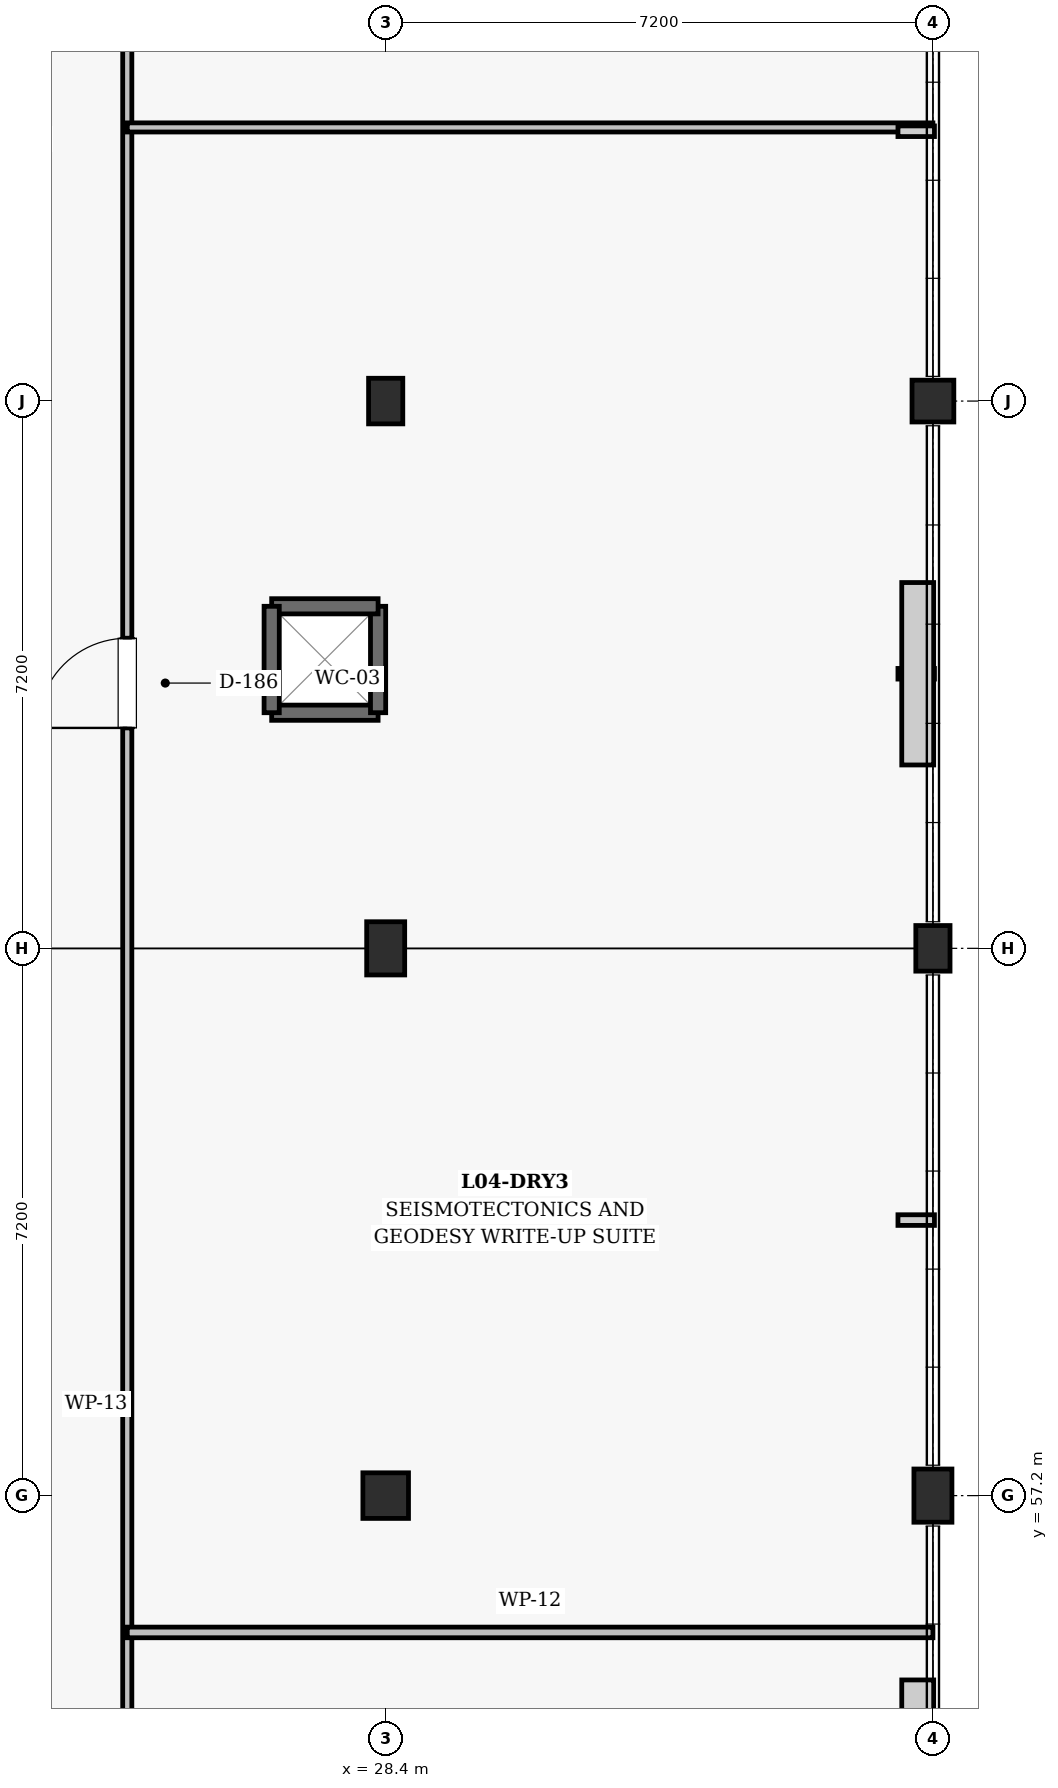
"""IFC4 building model, lengths in metres.
Left out: names, types, materials, properties, quantities, classifications, styles, units other than length and angle.
Written with IfcOpenShell. Run it as: python <this file> out.ifc"""

import sys

from ifc_helpers import new_model, si_unit, direction, frame, frame_2d, origin, origin_2d, place, context, subcontext, project, spatial, rectangle, extrude, element, fill, save


model = new_model("IFC4")
c1 = context("Model", 3, precision=1e-05, world=origin(), true_north=direction((0.0, 1.0)))
c2 = subcontext(c1, "Body", "Model", "MODEL_VIEW")
j1 = project(units=[si_unit("LENGTHUNIT", "METRE"), si_unit("PLANEANGLEUNIT", "RADIAN")], contexts=[c1])
p1 = place(None, origin())
s1 = spatial("IfcSite", under=j1, at=p1, CompositionType="ELEMENT")
p2 = place(p1, origin())
s2 = spatial("IfcBuilding", under=s1, at=p2, CompositionType="ELEMENT")
p3 = place(p2, frame((0.0, 0.0, 18.9)))
s3 = spatial("IfcBuildingStorey", under=s2, at=p3, CompositionType="ELEMENT", Elevation=18.9)
p4 = place(p3, frame((28.4, 57.2, 0.0), z_axis=(0.0, 0.0, 1.0), x_axis=(1.0, 0.0, 0.0)))
e1 = element("IfcColumn", 1, at=p4, inside=s3, PredefinedType="COLUMN", context=c2, shape_type="SweptSolid", body=[
    extrude(rectangle(XDim=0.6, YDim=0.6, at=origin_2d()), origin(), (0.0, 0.0, 1.0), 4.5),
])
p5 = place(p3, frame((28.4, 64.4, 0.0), z_axis=(0.0, 0.0, 1.0), x_axis=(1.0, 0.0, 0.0)))
e2 = element("IfcColumn", 2, at=p5, inside=s3, PredefinedType="COLUMN", context=c2, shape_type="SweptSolid", body=[
    extrude(rectangle(XDim=0.5, YDim=0.7, at=origin_2d()), origin(), (0.0, 0.0, 1.0), 4.5),
])
p6 = place(p3, frame((28.4, 71.6, 0.0), z_axis=(0.0, 0.0, 1.0), x_axis=(1.0, 0.0, 0.0)))
e3 = element("IfcColumn", 3, at=p6, inside=s3, PredefinedType="COLUMN", context=c2, shape_type="SweptSolid", body=[
    extrude(rectangle(XDim=0.45, YDim=0.6, at=origin_2d()), origin(), (0.0, 0.0, 1.0), 4.5),
])
p7 = place(p3, frame((35.6, 57.2, 0.0), z_axis=(0.0, 0.0, 1.0), x_axis=(1.0, 0.0, 0.0)))
e4 = element("IfcColumn", 4, at=p7, inside=s3, PredefinedType="COLUMN", context=c2, shape_type="SweptSolid", body=[
    extrude(rectangle(XDim=0.5, YDim=0.7, at=origin_2d()), origin(), (0.0, 0.0, 1.0), 4.5),
])
p8 = place(p3, frame((35.6, 64.4, 0.0), z_axis=(0.0, 0.0, 1.0), x_axis=(1.0, 0.0, 0.0)))
e5 = element("IfcColumn", 5, at=p8, inside=s3, PredefinedType="COLUMN", context=c2, shape_type="SweptSolid", body=[
    extrude(rectangle(XDim=0.45, YDim=0.6, at=origin_2d()), origin(), (0.0, 0.0, 1.0), 4.5),
])
p9 = place(p3, frame((35.6, 71.6, 0.0), z_axis=(0.0, 0.0, 1.0), x_axis=(1.0, 0.0, 0.0)))
e6 = element("IfcColumn", 6, at=p9, inside=s3, PredefinedType="COLUMN", context=c2, shape_type="SweptSolid", body=[
    extrude(rectangle(XDim=0.55, YDim=0.55, at=origin_2d()), origin(), (0.0, 0.0, 1.0), 4.5),
])
p10 = place(p3, frame((26.9, 67.5, 0.0), z_axis=(0.0, 0.0, 1.0), x_axis=(1.0, 0.0, 0.0)))
e7 = element("IfcWall", 7, at=p10, inside=s3, PredefinedType="SHEAR", context=c2, shape_type="SweptSolid", body=[
    extrude(rectangle(XDim=1.4, YDim=0.2, at=frame_2d((0.7, 0.0))), origin(), (0.0, 0.0, 1.0), 4.16),
])
p11 = place(p3, frame((28.3, 67.5, 0.0), z_axis=(0.0, 0.0, 1.0), x_axis=(0.0, 1.0, 0.0)))
e8 = element("IfcWall", 8, at=p11, inside=s3, PredefinedType="SHEAR", context=c2, shape_type="SweptSolid", body=[
    extrude(rectangle(XDim=1.4, YDim=0.2, at=frame_2d((0.7, 0.0))), origin(), (0.0, 0.0, 1.0), 4.16),
])
p12 = place(p3, frame((28.3, 68.9, 0.0), z_axis=(0.0, 0.0, 1.0), x_axis=(-1.0, 0.0, 0.0)))
e9 = element("IfcWall", 9, at=p12, inside=s3, PredefinedType="SHEAR", context=c2, shape_type="SweptSolid", body=[
    extrude(rectangle(XDim=1.4, YDim=0.2, at=frame_2d((0.7, 0.0))), origin(), (0.0, 0.0, 1.0), 4.16),
])
p13 = place(p3, frame((26.9, 68.9, 0.0), z_axis=(0.0, 0.0, 1.0), x_axis=(0.0, -1.0, 0.0)))
e10 = element("IfcWall", 10, at=p13, inside=s3, PredefinedType="SHEAR", context=c2, shape_type="SweptSolid", body=[
    extrude(rectangle(XDim=1.4, YDim=0.2, at=frame_2d((0.7, 0.0))), origin(), (0.0, 0.0, 1.0), 4.16),
])
p14 = place(p3, frame((25.0, 14.0, 0.0), z_axis=(0.0, 0.0, 1.0), x_axis=(0.0, 1.0, 0.0)))
e11 = element("IfcWall", 11, at=p14, inside=s3, PredefinedType="PARTITIONING", context=c2, shape_type="SweptSolid", body=[
    extrude(rectangle(XDim=88.8, YDim=0.12, at=frame_2d((44.4, 0.0))), origin(), (0.0, 0.0, 1.0), 3.38),
])
p15 = place(p14, frame((11.0, 0.0, 0.0)))
e12 = element("IfcOpeningElement", 12, at=p15, cuts=e11, PredefinedType="OPENING", context=c2, shape_type="SweptSolid", body=[
    extrude(rectangle(XDim=1.0, YDim=2.15, at=frame_2d((0.5, 1.075))), frame((0.0, 0.07, 0.0), z_axis=(0.0, -1.0, 0.0), x_axis=(1.0, 0.0, 0.0)), (0.0, 0.0, 1.0), 0.14),
])
p16 = place(p14, frame((31.5, 0.0, 0.0)))
e13 = element("IfcOpeningElement", 13, at=p16, cuts=e11, PredefinedType="OPENING", context=c2, shape_type="SweptSolid", body=[
    extrude(rectangle(XDim=1.1, YDim=2.15, at=frame_2d((0.55, 1.075))), frame((0.0, 0.07, 0.0), z_axis=(0.0, -1.0, 0.0), x_axis=(1.0, 0.0, 0.0)), (0.0, 0.0, 1.0), 0.14),
])
p17 = place(p14, frame((53.3, 0.0, 0.0)))
e14 = element("IfcOpeningElement", 14, at=p17, cuts=e11, PredefinedType="OPENING", context=c2, shape_type="SweptSolid", body=[
    extrude(rectangle(XDim=1.18, YDim=2.2, at=frame_2d((0.59, 1.1))), frame((0.0, 0.07, 0.0), z_axis=(0.0, -1.0, 0.0), x_axis=(1.0, 0.0, 0.0)), (0.0, 0.0, 1.0), 0.14),
])
p18 = place(p14, frame((69.3, 0.0, 0.0)))
e15 = element("IfcOpeningElement", 15, at=p18, cuts=e11, PredefinedType="OPENING", context=c2, shape_type="SweptSolid", body=[
    extrude(rectangle(XDim=1.25, YDim=2.2, at=frame_2d((0.625, 1.1))), frame((0.0, 0.07, 0.0), z_axis=(0.0, -1.0, 0.0), x_axis=(1.0, 0.0, 0.0)), (0.0, 0.0, 1.0), 0.14),
])
p19 = place(p14, frame((82.9, 0.0, 0.0)))
e16 = element("IfcOpeningElement", 16, at=p19, cuts=e11, PredefinedType="OPENING", context=c2, shape_type="SweptSolid", body=[
    extrude(rectangle(XDim=1.35, YDim=2.2, at=frame_2d((0.675, 1.1))), frame((0.0, 0.07, 0.0), z_axis=(0.0, -1.0, 0.0), x_axis=(1.0, 0.0, 0.0)), (0.0, 0.0, 1.0), 0.14),
])
p20 = place(p3, frame((25.0, 55.4, 0.0), z_axis=(0.0, 0.0, 1.0), x_axis=(1.0, 0.0, 0.0)))
e17 = element("IfcWall", 17, at=p20, inside=s3, PredefinedType="PARTITIONING", context=c2, shape_type="SweptSolid", body=[
    extrude(rectangle(XDim=10.6, YDim=0.14, at=frame_2d((5.3, 0.0))), origin(), (0.0, 0.0, 1.0), 3.48),
])
p21 = place(p3, frame((25.0, 75.2, 0.0), z_axis=(0.0, 0.0, 1.0), x_axis=(1.0, 0.0, 0.0)))
e18 = element("IfcWall", 18, at=p21, inside=s3, PredefinedType="PARTITIONING", context=c2, shape_type="SweptSolid", body=[
    extrude(rectangle(XDim=10.6, YDim=0.12, at=frame_2d((5.3, 0.0))), origin(), (0.0, 0.0, 1.0), 3.58),
])
p22 = place(p17, origin())
e19 = element("IfcDoor", 19, at=p22, inside=s3, OperationType="SINGLE_SWING_LEFT", PredefinedType="DOOR", context=c2, shape_type="SweptSolid", body=[
    extrude(rectangle(XDim=1.18, YDim=2.2, at=frame_2d((0.59, 1.1))), frame((0.0, 0.025, 0.0), z_axis=(0.0, -1.0, 0.0), x_axis=(1.0, 0.0, 0.0)), (0.0, 0.0, 1.0), 0.05),
])
fill(e14, e19)
save(model, sys.argv[1])
